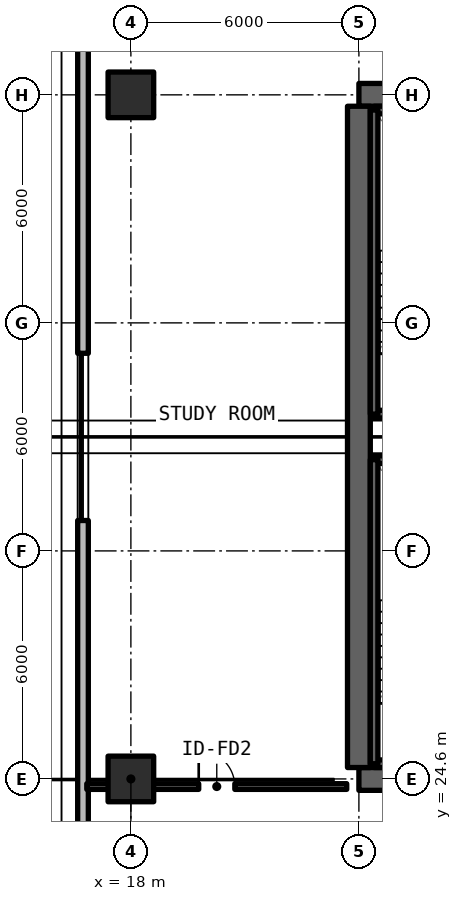
"""IFC4 building model, lengths in metres.
Left out: names, types, materials, properties, quantities, classifications, styles, units other than length and angle.
Written with IfcOpenShell. Run it as: python <this file> out.ifc"""

import sys

from ifc_helpers import new_model, si_unit, direction, frame, frame_2d, origin, origin_2d, place, context, subcontext, project, spatial, rectangle, extrude, element, fill, save


model = new_model("IFC4")
c1 = context("Model", 3, precision=1e-05, world=origin(), true_north=direction((0.0, 1.0)))
c2 = subcontext(c1, "Body", "Model", "MODEL_VIEW")
j1 = project(units=[si_unit("LENGTHUNIT", "METRE"), si_unit("PLANEANGLEUNIT", "RADIAN")], contexts=[c1])
p1 = place(None, origin())
s1 = spatial("IfcSite", under=j1, at=p1, CompositionType="ELEMENT")
p2 = place(p1, origin())
s2 = spatial("IfcBuilding", under=s1, at=p2, CompositionType="ELEMENT")
p3 = place(p2, frame((0.0, 0.0, 48.84)))
s3 = spatial("IfcBuildingStorey", under=s2, at=p3, CompositionType="ELEMENT", Elevation=48.84)
for number, where, z_axis, x_axis in (
    (1, (24.0, 24.6, 0.0), (0.0, 0.0, 1.0), (1.0, 0.0, 0.0)),
    (2, (36.0, 42.6, 0.0), (0.0, 0.0, 1.0), (-1.0, 0.0, 0.0)),
):
    element("IfcWall", number, at=place(p3, frame(where, z_axis=z_axis, x_axis=x_axis)), inside=s3, PredefinedType="SHEAR", context=c2, shape_type="SweptSolid", body=[
        extrude(rectangle(XDim=12.0, YDim=0.6, at=frame_2d((6.0, 0.0))), origin(), (0.0, 0.0, 1.0), 3.3),
    ])
p4 = place(p3, frame((24.0, 24.9, 0.0), z_axis=(0.0, 0.0, 1.0), x_axis=(0.0, 1.0, 0.0)))
e3 = element("IfcWall", 3, at=p4, inside=s3, PredefinedType="SHEAR", context=c2, shape_type="SweptSolid", body=[
    extrude(rectangle(XDim=17.4, YDim=0.6, at=frame_2d((8.7, 0.0))), origin(), (0.0, 0.0, 1.0), 3.3),
])
for number, where, z_axis, x_axis in (
    (4, (18.0, 24.6, 0.0), (0.0, 0.0, 1.0), (1.0, 0.0, 0.0)),
    (5, (18.0, 42.6, 0.0), (0.0, 0.0, 1.0), (1.0, 0.0, 0.0)),
):
    element("IfcColumn", number, at=place(p3, frame(where, z_axis=z_axis, x_axis=x_axis)), inside=s3, PredefinedType="COLUMN", context=c2, shape_type="SweptSolid", body=[
        extrude(rectangle(XDim=1.2, YDim=1.2, at=origin_2d()), origin(), (0.0, 0.0, 1.0), 3.3),
    ])
p5 = place(p3, frame((16.74, 55.342, 0.0), z_axis=(0.0, 0.0, 1.0), x_axis=(0.0, -1.0, 0.0)))
e6 = element("IfcWall", 6, at=p5, inside=s3, PredefinedType="SOLIDWALL", context=c2, shape_type="SweptSolid", body=[
    extrude(rectangle(XDim=43.484, YDim=0.28, at=frame_2d((21.742, 0.0))), origin(), (0.0, 0.0, 1.0), 3.08),
])
p6 = place(p5, frame((19.542, 0.0, 0.78)))
e7 = element("IfcOpeningElement", 7, at=p6, cuts=e6, PredefinedType="OPENING", context=c2, shape_type="SweptSolid", body=[
    extrude(rectangle(XDim=4.4, YDim=1.66, at=frame_2d((2.2, 0.83))), frame((0.0, 0.15, 0.0), z_axis=(0.0, -1.0, 0.0), x_axis=(1.0, 0.0, 0.0)), (0.0, 0.0, 1.0), 0.3),
])
p7 = place(p5, frame((37.573, 0.0, 0.78)))
e8 = element("IfcOpeningElement", 8, at=p7, cuts=e6, PredefinedType="OPENING", context=c2, shape_type="SweptSolid", body=[
    extrude(rectangle(XDim=4.4, YDim=1.66, at=frame_2d((2.2, 0.83))), frame((0.0, 0.15, 0.0), z_axis=(0.0, -1.0, 0.0), x_axis=(1.0, 0.0, 0.0)), (0.0, 0.0, 1.0), 0.3),
])
p8 = place(p3, frame((16.84, 24.4, 0.0), z_axis=(0.0, 0.0, 1.0), x_axis=(1.0, 0.0, 0.0)))
e9 = element("IfcWall", 9, at=p8, inside=s3, PredefinedType="SOLIDWALL", context=c2, shape_type="SweptSolid", body=[
    extrude(rectangle(XDim=6.84, YDim=0.15, at=frame_2d((3.42, 0.0))), origin(), (0.0, 0.0, 1.0), 2.295),
])
p9 = place(p8, frame((2.945, 0.0, 0.0)))
e10 = element("IfcOpeningElement", 10, at=p9, cuts=e9, PredefinedType="OPENING", context=c2, shape_type="SweptSolid", body=[
    extrude(rectangle(XDim=0.95, YDim=2.15, at=frame_2d((0.475, 1.075))), frame((0.0, 0.085, 0.0), z_axis=(0.0, -1.0, 0.0), x_axis=(1.0, 0.0, 0.0)), (0.0, 0.0, 1.0), 0.17),
])
for number, where, z_axis, x_axis in (
    (11, (24.4, 25.0, 0.0), (0.0, 0.0, 1.0), (1.0, 0.0, 0.0)),
    (12, (27.8, 33.0, 0.0), (0.0, 0.0, 1.0), (-1.0, 0.0, 0.0)),
):
    element("IfcWall", number, at=place(p3, frame(where, z_axis=z_axis, x_axis=x_axis)), inside=s3, PredefinedType="SOLIDWALL", context=c2, shape_type="SweptSolid", body=[
        extrude(rectangle(XDim=3.4, YDim=0.2, at=frame_2d((1.7, 0.0))), origin(), (0.0, 0.0, 1.0), 3.3),
    ])
p10 = place(p3, frame((24.4, 33.0, 0.0), z_axis=(0.0, 0.0, 1.0), x_axis=(0.0, -1.0, 0.0)))
e13 = element("IfcWall", 13, at=p10, inside=s3, PredefinedType="SOLIDWALL", context=c2, shape_type="SweptSolid", body=[
    extrude(rectangle(XDim=8.0, YDim=0.2, at=frame_2d((4.0, 0.0))), origin(), (0.0, 0.0, 1.0), 3.3),
])
for number, where, z_axis, x_axis in (
    (14, (24.4, 34.2, 0.0), (0.0, 0.0, 1.0), (1.0, 0.0, 0.0)),
    (15, (27.8, 42.2, 0.0), (0.0, 0.0, 1.0), (-1.0, 0.0, 0.0)),
):
    element("IfcWall", number, at=place(p3, frame(where, z_axis=z_axis, x_axis=x_axis)), inside=s3, PredefinedType="SOLIDWALL", context=c2, shape_type="SweptSolid", body=[
        extrude(rectangle(XDim=3.4, YDim=0.2, at=frame_2d((1.7, 0.0))), origin(), (0.0, 0.0, 1.0), 3.3),
    ])
p11 = place(p3, frame((24.4, 42.2, 0.0), z_axis=(0.0, 0.0, 1.0), x_axis=(0.0, -1.0, 0.0)))
e16 = element("IfcWall", 16, at=p11, inside=s3, PredefinedType="SOLIDWALL", context=c2, shape_type="SweptSolid", body=[
    extrude(rectangle(XDim=8.0, YDim=0.2, at=frame_2d((4.0, 0.0))), origin(), (0.0, 0.0, 1.0), 3.3),
])
p12 = place(p6, origin())
e17 = element("IfcWindow", 17, at=p12, inside=s3, PartitioningType="SINGLE_PANEL", PredefinedType="WINDOW", context=c2, shape_type="SweptSolid", body=[
    extrude(rectangle(XDim=4.4, YDim=1.66, at=frame_2d((2.2, 0.83))), frame((0.0, 0.03, 0.0), z_axis=(0.0, -1.0, 0.0), x_axis=(1.0, 0.0, 0.0)), (0.0, 0.0, 1.0), 0.06),
])
fill(e7, e17)
p13 = place(p9, origin())
e18 = element("IfcDoor", 18, at=p13, inside=s3, OperationType="SINGLE_SWING_LEFT", PredefinedType="DOOR", context=c2, shape_type="SweptSolid", body=[
    extrude(rectangle(XDim=0.95, YDim=2.15, at=frame_2d((0.475, 1.075))), frame((0.0, 0.025, 0.0), z_axis=(0.0, -1.0, 0.0), x_axis=(1.0, 0.0, 0.0)), (0.0, 0.0, 1.0), 0.05),
])
fill(e10, e18)
save(model, sys.argv[1])
